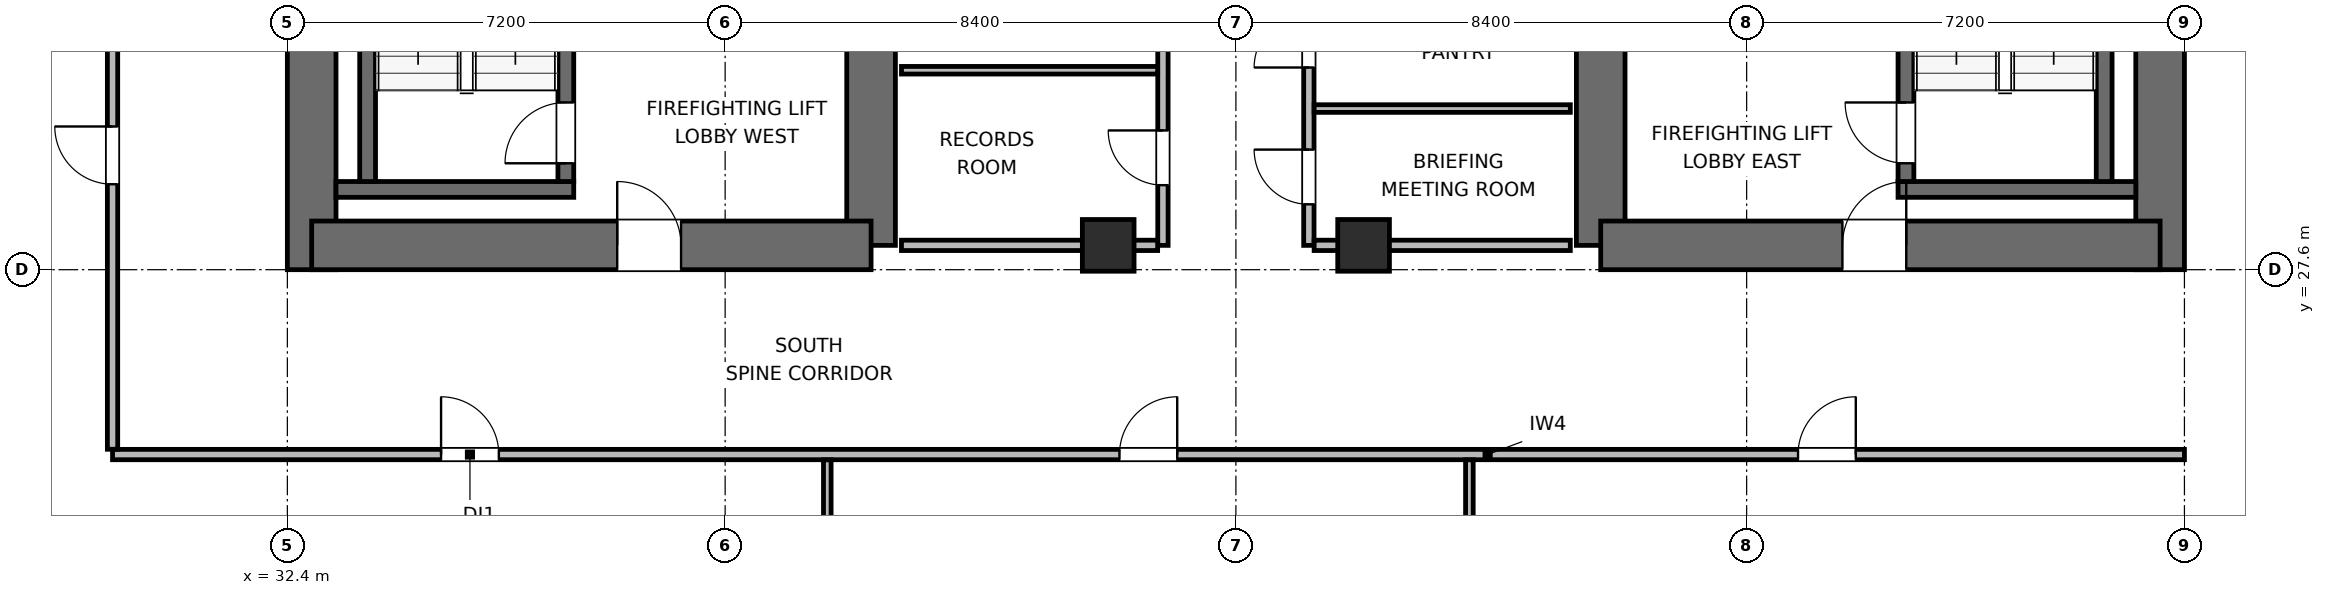
"""IFC4 building model, lengths in metres.
Left out: names, types, materials, properties, quantities, classifications, styles, units other than length and angle.
Written with IfcOpenShell. Run it as: python <this file> out.ifc"""

import sys

from ifc_helpers import new_model, si_unit, direction, frame, frame_2d, origin, origin_2d, place, context, subcontext, project, spatial, rectangle, extrude, element, fill, save


model = new_model("IFC4")
c1 = context("Model", 3, precision=1e-05, world=origin(), true_north=direction((0.0, 1.0)))
c2 = subcontext(c1, "Body", "Model", "MODEL_VIEW")
j1 = project(units=[si_unit("LENGTHUNIT", "METRE"), si_unit("PLANEANGLEUNIT", "RADIAN")], contexts=[c1])
p1 = place(None, origin())
s1 = spatial("IfcSite", under=j1, at=p1, CompositionType="ELEMENT")
p2 = place(p1, origin())
s2 = spatial("IfcBuilding", under=s1, at=p2, CompositionType="ELEMENT")
p3 = place(p2, frame((0.0, 0.0, 174.0)))
s3 = spatial("IfcBuildingStorey", under=s2, at=p3, CompositionType="ELEMENT", Elevation=174.0)
p4 = place(p3, frame((32.8, 27.6, 0.0), z_axis=(0.0, 0.0, 1.0), x_axis=(0.0, 1.0, 0.0)))
e1 = element("IfcWall", 1, at=p4, inside=s3, PredefinedType="SHEAR", context=c2, shape_type="SweptSolid", body=[
    extrude(rectangle(XDim=16.8, YDim=0.8, at=frame_2d((8.4, 0.0))), origin(), (0.0, 0.0, 1.0), 3.9),
])
p5 = place(p3, frame((42.0, 28.0, 0.0), z_axis=(0.0, 0.0, 1.0), x_axis=(0.0, 1.0, 0.0)))
e2 = element("IfcWall", 2, at=p5, inside=s3, PredefinedType="SHEAR", context=c2, shape_type="SweptSolid", body=[
    extrude(rectangle(XDim=6.4, YDim=0.8, at=frame_2d((3.2, 0.0))), origin(), (0.0, 0.0, 1.0), 3.9),
])
p6 = place(p3, frame((32.8, 28.0, 0.0), z_axis=(0.0, 0.0, 1.0), x_axis=(1.0, 0.0, 0.0)))
e3 = element("IfcWall", 3, at=p6, inside=s3, PredefinedType="SHEAR", context=c2, shape_type="SweptSolid", body=[
    extrude(rectangle(XDim=9.2, YDim=0.8, at=frame_2d((4.6, 0.0))), origin(), (0.0, 0.0, 1.0), 3.9),
])
p7 = place(p6, frame((5.025, 0.0, 0.0)))
e4 = element("IfcOpeningElement", 4, at=p7, cuts=e3, PredefinedType="OPENING", context=c2, shape_type="SweptSolid", body=[
    extrude(rectangle(XDim=1.05, YDim=2.04, at=frame_2d((0.525, 1.02))), frame((0.0, 0.41, 0.0), z_axis=(0.0, -1.0, 0.0), x_axis=(1.0, 0.0, 0.0)), (0.0, 0.0, 1.0), 0.82),
])
p8 = place(p3, frame((54.0, 28.0, 0.0), z_axis=(0.0, 0.0, 1.0), x_axis=(0.0, 1.0, 0.0)))
e5 = element("IfcWall", 5, at=p8, inside=s3, PredefinedType="SHEAR", context=c2, shape_type="SweptSolid", body=[
    extrude(rectangle(XDim=7.8, YDim=0.8, at=frame_2d((3.9, 0.0))), origin(), (0.0, 0.0, 1.0), 3.9),
])
p9 = place(p3, frame((63.2, 27.6, 0.0), z_axis=(0.0, 0.0, 1.0), x_axis=(0.0, 1.0, 0.0)))
e6 = element("IfcWall", 6, at=p9, inside=s3, PredefinedType="SHEAR", context=c2, shape_type="SweptSolid", body=[
    extrude(rectangle(XDim=16.8, YDim=0.8, at=frame_2d((8.4, 0.0))), origin(), (0.0, 0.0, 1.0), 3.9),
])
p10 = place(p3, frame((54.0, 28.0, 0.0), z_axis=(0.0, 0.0, 1.0), x_axis=(1.0, 0.0, 0.0)))
e7 = element("IfcWall", 7, at=p10, inside=s3, PredefinedType="SHEAR", context=c2, shape_type="SweptSolid", body=[
    extrude(rectangle(XDim=9.2, YDim=0.8, at=frame_2d((4.6, 0.0))), origin(), (0.0, 0.0, 1.0), 3.9),
])
p11 = place(p10, frame((3.975, 0.0, 0.0)))
e8 = element("IfcOpeningElement", 8, at=p11, cuts=e7, PredefinedType="OPENING", context=c2, shape_type="SweptSolid", body=[
    extrude(rectangle(XDim=1.05, YDim=2.04, at=frame_2d((0.525, 1.02))), frame((0.0, 0.41, 0.0), z_axis=(0.0, -1.0, 0.0), x_axis=(1.0, 0.0, 0.0)), (0.0, 0.0, 1.0), 0.82),
])
p12 = place(p3, frame((33.2, 28.92, 0.0), z_axis=(0.0, 0.0, 1.0), x_axis=(1.0, 0.0, 0.0)))
e9 = element("IfcWall", 9, at=p12, inside=s3, PredefinedType="SHEAR", context=c2, shape_type="SweptSolid", body=[
    extrude(rectangle(XDim=3.91, YDim=0.26, at=frame_2d((1.955, 0.0))), origin(), (0.0, 0.0, 1.0), 3.9),
])
p13 = place(p3, frame((33.72, 29.05, 0.0), z_axis=(0.0, 0.0, 1.0), x_axis=(0.0, 1.0, 0.0)))
e10 = element("IfcWall", 10, at=p13, inside=s3, PredefinedType="SHEAR", context=c2, shape_type="SweptSolid", body=[
    extrude(rectangle(XDim=7.6, YDim=0.26, at=frame_2d((3.8, 0.0))), origin(), (0.0, 0.0, 1.0), 3.9),
])
p14 = place(p3, frame((36.98, 29.05, 0.0), z_axis=(0.0, 0.0, 1.0), x_axis=(0.0, 1.0, 0.0)))
e11 = element("IfcWall", 11, at=p14, inside=s3, PredefinedType="SHEAR", context=c2, shape_type="SweptSolid", body=[
    extrude(rectangle(XDim=7.6, YDim=0.26, at=frame_2d((3.8, 0.0))), origin(), (0.0, 0.0, 1.0), 3.9),
])
p15 = place(p14, frame((0.3, 0.0, 0.0)))
e12 = element("IfcOpeningElement", 12, at=p15, cuts=e11, PredefinedType="OPENING", context=c2, shape_type="SweptSolid", body=[
    extrude(rectangle(XDim=1.0, YDim=2.04, at=frame_2d((0.5, 1.02))), frame((0.0, 0.14, 0.0), z_axis=(0.0, -1.0, 0.0), x_axis=(1.0, 0.0, 0.0)), (0.0, 0.0, 1.0), 0.28),
])
p16 = place(p3, frame((58.89, 28.92, 0.0), z_axis=(0.0, 0.0, 1.0), x_axis=(1.0, 0.0, 0.0)))
e13 = element("IfcWall", 13, at=p16, inside=s3, PredefinedType="SHEAR", context=c2, shape_type="SweptSolid", body=[
    extrude(rectangle(XDim=3.91, YDim=0.26, at=frame_2d((1.955, 0.0))), origin(), (0.0, 0.0, 1.0), 3.9),
])
p17 = place(p3, frame((59.02, 29.05, 0.0), z_axis=(0.0, 0.0, 1.0), x_axis=(0.0, 1.0, 0.0)))
e14 = element("IfcWall", 14, at=p17, inside=s3, PredefinedType="SHEAR", context=c2, shape_type="SweptSolid", body=[
    extrude(rectangle(XDim=7.6, YDim=0.26, at=frame_2d((3.8, 0.0))), origin(), (0.0, 0.0, 1.0), 3.9),
])
p18 = place(p17, frame((0.3, 0.0, 0.0)))
e15 = element("IfcOpeningElement", 15, at=p18, cuts=e14, PredefinedType="OPENING", context=c2, shape_type="SweptSolid", body=[
    extrude(rectangle(XDim=1.0, YDim=2.04, at=frame_2d((0.5, 1.02))), frame((0.0, 0.14, 0.0), z_axis=(0.0, -1.0, 0.0), x_axis=(1.0, 0.0, 0.0)), (0.0, 0.0, 1.0), 0.28),
])
p19 = place(p3, frame((62.28, 29.05, 0.0), z_axis=(0.0, 0.0, 1.0), x_axis=(0.0, 1.0, 0.0)))
e16 = element("IfcWall", 16, at=p19, inside=s3, PredefinedType="SHEAR", context=c2, shape_type="SweptSolid", body=[
    extrude(rectangle(XDim=7.6, YDim=0.26, at=frame_2d((3.8, 0.0))), origin(), (0.0, 0.0, 1.0), 3.9),
])
for number, where, z_axis, x_axis in (
    (17, (45.9, 28.0, 0.0), (0.0, 0.0, 1.0), (1.0, 0.0, 0.0)),
    (18, (50.1, 28.0, 0.0), (0.0, 0.0, 1.0), (1.0, 0.0, 0.0)),
):
    element("IfcColumn", number, at=place(p3, frame(where, z_axis=z_axis, x_axis=x_axis)), inside=s3, PredefinedType="COLUMN", context=c2, shape_type="SweptSolid", body=[
        extrude(rectangle(XDim=0.85, YDim=0.85, at=origin_2d()), origin(), (0.0, 0.0, 1.0), 3.9),
    ])
p20 = place(p3, frame((46.8, 28.0, 0.0), z_axis=(0.0, 0.0, 1.0), x_axis=(0.0, 1.0, 0.0)))
e19 = element("IfcWall", 19, at=p20, inside=s3, PredefinedType="PARTITIONING", context=c2, shape_type="SweptSolid", body=[
    extrude(rectangle(XDim=4.5, YDim=0.17, at=frame_2d((2.25, 0.0))), origin(), (0.0, 0.0, 1.0), 3.68),
])
p21 = place(p20, frame((0.99, 0.0, 0.0)))
e20 = element("IfcOpeningElement", 20, at=p21, cuts=e19, PredefinedType="OPENING", context=c2, shape_type="SweptSolid", body=[
    extrude(rectangle(XDim=0.9, YDim=2.02, at=frame_2d((0.45, 1.01))), frame((0.0, 0.095, 0.0), z_axis=(0.0, -1.0, 0.0), x_axis=(1.0, 0.0, 0.0)), (0.0, 0.0, 1.0), 0.19),
])
p22 = place(p20, frame((3.24, 0.0, 0.0)))
e21 = element("IfcOpeningElement", 21, at=p22, cuts=e19, PredefinedType="OPENING", context=c2, shape_type="SweptSolid", body=[
    extrude(rectangle(XDim=0.9, YDim=2.02, at=frame_2d((0.45, 1.01))), frame((0.0, 0.095, 0.0), z_axis=(0.0, -1.0, 0.0), x_axis=(1.0, 0.0, 0.0)), (0.0, 0.0, 1.0), 0.19),
])
p23 = place(p3, frame((42.5, 28.0, 0.0), z_axis=(0.0, 0.0, 1.0), x_axis=(1.0, 0.0, 0.0)))
e22 = element("IfcWall", 22, at=p23, inside=s3, PredefinedType="PARTITIONING", context=c2, shape_type="SweptSolid", body=[
    extrude(rectangle(XDim=4.213, YDim=0.17, at=frame_2d((2.106, 0.0))), origin(), (0.0, 0.0, 1.0), 2.765),
])
p24 = place(p3, frame((42.5, 30.88, 0.0), z_axis=(0.0, 0.0, 1.0), x_axis=(1.0, 0.0, 0.0)))
e23 = element("IfcWall", 23, at=p24, inside=s3, PredefinedType="PARTITIONING", context=c2, shape_type="SweptSolid", body=[
    extrude(rectangle(XDim=4.213, YDim=0.125, at=frame_2d((2.106, 0.0))), origin(), (0.0, 0.0, 1.0), 3.68),
])
p25 = place(p3, frame((49.2, 28.0, 0.0), z_axis=(0.0, 0.0, 1.0), x_axis=(0.0, 1.0, 0.0)))
e24 = element("IfcWall", 24, at=p25, inside=s3, PredefinedType="PARTITIONING", context=c2, shape_type="SweptSolid", body=[
    extrude(rectangle(XDim=4.5, YDim=0.17, at=frame_2d((2.25, 0.0))), origin(), (0.0, 0.0, 1.0), 3.68),
])
p26 = place(p25, frame((0.675, 0.0, 0.0)))
e25 = element("IfcOpeningElement", 25, at=p26, cuts=e24, PredefinedType="OPENING", context=c2, shape_type="SweptSolid", body=[
    extrude(rectangle(XDim=0.9, YDim=2.02, at=frame_2d((0.45, 1.01))), frame((0.0, 0.095, 0.0), z_axis=(0.0, -1.0, 0.0), x_axis=(1.0, 0.0, 0.0)), (0.0, 0.0, 1.0), 0.19),
])
p27 = place(p25, frame((2.925, 0.0, 0.0)))
e26 = element("IfcOpeningElement", 26, at=p27, cuts=e24, PredefinedType="OPENING", context=c2, shape_type="SweptSolid", body=[
    extrude(rectangle(XDim=0.9, YDim=2.02, at=frame_2d((0.45, 1.01))), frame((0.0, 0.095, 0.0), z_axis=(0.0, -1.0, 0.0), x_axis=(1.0, 0.0, 0.0)), (0.0, 0.0, 1.0), 0.19),
])
p28 = place(p3, frame((49.287, 28.0, 0.0), z_axis=(0.0, 0.0, 1.0), x_axis=(1.0, 0.0, 0.0)))
e27 = element("IfcWall", 27, at=p28, inside=s3, PredefinedType="PARTITIONING", context=c2, shape_type="SweptSolid", body=[
    extrude(rectangle(XDim=4.213, YDim=0.17, at=frame_2d((2.106, 0.0))), origin(), (0.0, 0.0, 1.0), 2.765),
])
p29 = place(p3, frame((49.287, 30.25, 0.0), z_axis=(0.0, 0.0, 1.0), x_axis=(1.0, 0.0, 0.0)))
e28 = element("IfcWall", 28, at=p29, inside=s3, PredefinedType="PARTITIONING", context=c2, shape_type="SweptSolid", body=[
    extrude(rectangle(XDim=4.213, YDim=0.125, at=frame_2d((2.106, 0.0))), origin(), (0.0, 0.0, 1.0), 3.68),
])
p30 = place(p3, frame((29.525, 24.56, 0.0), z_axis=(0.0, 0.0, 1.0), x_axis=(1.0, 0.0, 0.0)))
e29 = element("IfcWall", 29, at=p30, inside=s3, PredefinedType="PARTITIONING", context=c2, shape_type="SweptSolid", body=[
    extrude(rectangle(XDim=34.075, YDim=0.17, at=frame_2d((17.038, 0.0))), origin(), (0.0, 0.0, 1.0), 3.68),
])
p31 = place(p30, frame((5.403, 0.0, 0.0)))
e30 = element("IfcOpeningElement", 30, at=p31, cuts=e29, PredefinedType="OPENING", context=c2, shape_type="SweptSolid", body=[
    extrude(rectangle(XDim=0.95, YDim=2.04, at=frame_2d((0.475, 1.02))), frame((0.0, 0.095, 0.0), z_axis=(0.0, -1.0, 0.0), x_axis=(1.0, 0.0, 0.0)), (0.0, 0.0, 1.0), 0.19),
])
p32 = place(p30, frame((16.56, 0.0, 0.0)))
e31 = element("IfcOpeningElement", 31, at=p32, cuts=e29, PredefinedType="OPENING", context=c2, shape_type="SweptSolid", body=[
    extrude(rectangle(XDim=0.95, YDim=2.04, at=frame_2d((0.475, 1.02))), frame((0.0, 0.095, 0.0), z_axis=(0.0, -1.0, 0.0), x_axis=(1.0, 0.0, 0.0)), (0.0, 0.0, 1.0), 0.19),
])
p33 = place(p30, frame((27.72, 0.0, 0.0)))
e32 = element("IfcOpeningElement", 32, at=p33, cuts=e29, PredefinedType="OPENING", context=c2, shape_type="SweptSolid", body=[
    extrude(rectangle(XDim=0.95, YDim=2.04, at=frame_2d((0.475, 1.02))), frame((0.0, 0.095, 0.0), z_axis=(0.0, -1.0, 0.0), x_axis=(1.0, 0.0, 0.0)), (0.0, 0.0, 1.0), 0.19),
])
p34 = place(p3, frame((29.525, 24.647, 0.0), z_axis=(0.0, 0.0, 1.0), x_axis=(0.0, 1.0, 0.0)))
e33 = element("IfcWall", 33, at=p34, inside=s3, PredefinedType="PARTITIONING", context=c2, shape_type="SweptSolid", body=[
    extrude(rectangle(XDim=9.753, YDim=0.17, at=frame_2d((4.876, 0.0))), origin(), (0.0, 0.0, 1.0), 3.68),
])
p35 = place(p34, frame((4.358, 0.0, 0.0)))
e34 = element("IfcOpeningElement", 34, at=p35, cuts=e33, PredefinedType="OPENING", context=c2, shape_type="SweptSolid", body=[
    extrude(rectangle(XDim=0.95, YDim=2.04, at=frame_2d((0.475, 1.02))), frame((0.0, 0.095, 0.0), z_axis=(0.0, -1.0, 0.0), x_axis=(1.0, 0.0, 0.0)), (0.0, 0.0, 1.0), 0.19),
])
p36 = place(p3, frame((41.28, 18.875, 0.0), z_axis=(0.0, 0.0, 1.0), x_axis=(0.0, 1.0, 0.0)))
e35 = element("IfcWall", 35, at=p36, inside=s3, PredefinedType="PARTITIONING", context=c2, shape_type="SweptSolid", body=[
    extrude(rectangle(XDim=5.598, YDim=0.125, at=frame_2d((2.799, 0.0))), origin(), (0.0, 0.0, 1.0), 3.043),
])
p37 = place(p3, frame((51.84, 20.475, 0.0), z_axis=(0.0, 0.0, 1.0), x_axis=(0.0, 1.0, 0.0)))
e36 = element("IfcWall", 36, at=p37, inside=s3, PredefinedType="PARTITIONING", context=c2, shape_type="SweptSolid", body=[
    extrude(rectangle(XDim=3.998, YDim=0.125, at=frame_2d((1.999, 0.0))), origin(), (0.0, 0.0, 1.0), 3.68),
])
p38 = place(p15, origin())
e37 = element("IfcDoor", 37, at=p38, inside=s3, OperationType="SINGLE_SWING_LEFT", PredefinedType="DOOR", context=c2, shape_type="SweptSolid", body=[
    extrude(rectangle(XDim=1.0, YDim=2.04, at=frame_2d((0.5, 1.02))), frame((0.0, 0.025, 0.0), z_axis=(0.0, -1.0, 0.0), x_axis=(1.0, 0.0, 0.0)), (0.0, 0.0, 1.0), 0.05),
])
fill(e12, e37)
p39 = place(p18, origin())
e38 = element("IfcDoor", 38, at=p39, inside=s3, OperationType="SINGLE_SWING_RIGHT", PredefinedType="DOOR", context=c2, shape_type="SweptSolid", body=[
    extrude(rectangle(XDim=1.0, YDim=2.04, at=frame_2d((0.5, 1.02))), frame((0.0, 0.025, 0.0), z_axis=(0.0, -1.0, 0.0), x_axis=(1.0, 0.0, 0.0)), (0.0, 0.0, 1.0), 0.05),
])
fill(e15, e38)
p40 = place(p7, origin())
e39 = element("IfcDoor", 39, at=p40, inside=s3, OperationType="SINGLE_SWING_LEFT", PredefinedType="DOOR", context=c2, shape_type="SweptSolid", body=[
    extrude(rectangle(XDim=1.05, YDim=2.04, at=frame_2d((0.525, 1.02))), frame((0.0, 0.025, 0.0), z_axis=(0.0, -1.0, 0.0), x_axis=(1.0, 0.0, 0.0)), (0.0, 0.0, 1.0), 0.05),
])
fill(e4, e39)
p41 = place(p11, origin())
e40 = element("IfcDoor", 40, at=p41, inside=s3, OperationType="SINGLE_SWING_RIGHT", PredefinedType="DOOR", context=c2, shape_type="SweptSolid", body=[
    extrude(rectangle(XDim=1.05, YDim=2.04, at=frame_2d((0.525, 1.02))), frame((0.0, 0.025, 0.0), z_axis=(0.0, -1.0, 0.0), x_axis=(1.0, 0.0, 0.0)), (0.0, 0.0, 1.0), 0.05),
])
fill(e8, e40)
p42 = place(p21, origin())
e41 = element("IfcDoor", 41, at=p42, inside=s3, OperationType="SINGLE_SWING_RIGHT", PredefinedType="DOOR", context=c2, shape_type="SweptSolid", body=[
    extrude(rectangle(XDim=0.9, YDim=2.02, at=frame_2d((0.45, 1.01))), frame((0.0, 0.025, 0.0), z_axis=(0.0, -1.0, 0.0), x_axis=(1.0, 0.0, 0.0)), (0.0, 0.0, 1.0), 0.05),
])
fill(e20, e41)
p43 = place(p26, origin())
e42 = element("IfcDoor", 42, at=p43, inside=s3, OperationType="SINGLE_SWING_RIGHT", PredefinedType="DOOR", context=c2, shape_type="SweptSolid", body=[
    extrude(rectangle(XDim=0.9, YDim=2.02, at=frame_2d((0.45, 1.01))), frame((0.0, 0.025, 0.0), z_axis=(0.0, -1.0, 0.0), x_axis=(1.0, 0.0, 0.0)), (0.0, 0.0, 1.0), 0.05),
])
fill(e25, e42)
p44 = place(p27, origin())
e43 = element("IfcDoor", 43, at=p44, inside=s3, OperationType="SINGLE_SWING_LEFT", PredefinedType="DOOR", context=c2, shape_type="SweptSolid", body=[
    extrude(rectangle(XDim=0.9, YDim=2.02, at=frame_2d((0.45, 1.01))), frame((0.0, 0.025, 0.0), z_axis=(0.0, -1.0, 0.0), x_axis=(1.0, 0.0, 0.0)), (0.0, 0.0, 1.0), 0.05),
])
fill(e26, e43)
p45 = place(p31, origin())
e44 = element("IfcDoor", 44, at=p45, inside=s3, OperationType="SINGLE_SWING_LEFT", PredefinedType="DOOR", context=c2, shape_type="SweptSolid", body=[
    extrude(rectangle(XDim=0.95, YDim=2.04, at=frame_2d((0.475, 1.02))), frame((0.0, 0.025, 0.0), z_axis=(0.0, -1.0, 0.0), x_axis=(1.0, 0.0, 0.0)), (0.0, 0.0, 1.0), 0.05),
])
fill(e30, e44)
p46 = place(p32, origin())
e45 = element("IfcDoor", 45, at=p46, inside=s3, OperationType="SINGLE_SWING_RIGHT", PredefinedType="DOOR", context=c2, shape_type="SweptSolid", body=[
    extrude(rectangle(XDim=0.95, YDim=2.04, at=frame_2d((0.475, 1.02))), frame((0.0, 0.025, 0.0), z_axis=(0.0, -1.0, 0.0), x_axis=(1.0, 0.0, 0.0)), (0.0, 0.0, 1.0), 0.05),
])
fill(e31, e45)
p47 = place(p33, origin())
e46 = element("IfcDoor", 46, at=p47, inside=s3, OperationType="SINGLE_SWING_RIGHT", PredefinedType="DOOR", context=c2, shape_type="SweptSolid", body=[
    extrude(rectangle(XDim=0.95, YDim=2.04, at=frame_2d((0.475, 1.02))), frame((0.0, 0.025, 0.0), z_axis=(0.0, -1.0, 0.0), x_axis=(1.0, 0.0, 0.0)), (0.0, 0.0, 1.0), 0.05),
])
fill(e32, e46)
p48 = place(p35, origin())
e47 = element("IfcDoor", 47, at=p48, inside=s3, OperationType="SINGLE_SWING_RIGHT", PredefinedType="DOOR", context=c2, shape_type="SweptSolid", body=[
    extrude(rectangle(XDim=0.95, YDim=2.04, at=frame_2d((0.475, 1.02))), frame((0.0, 0.025, 0.0), z_axis=(0.0, -1.0, 0.0), x_axis=(1.0, 0.0, 0.0)), (0.0, 0.0, 1.0), 0.05),
])
fill(e34, e47)
save(model, sys.argv[1])
